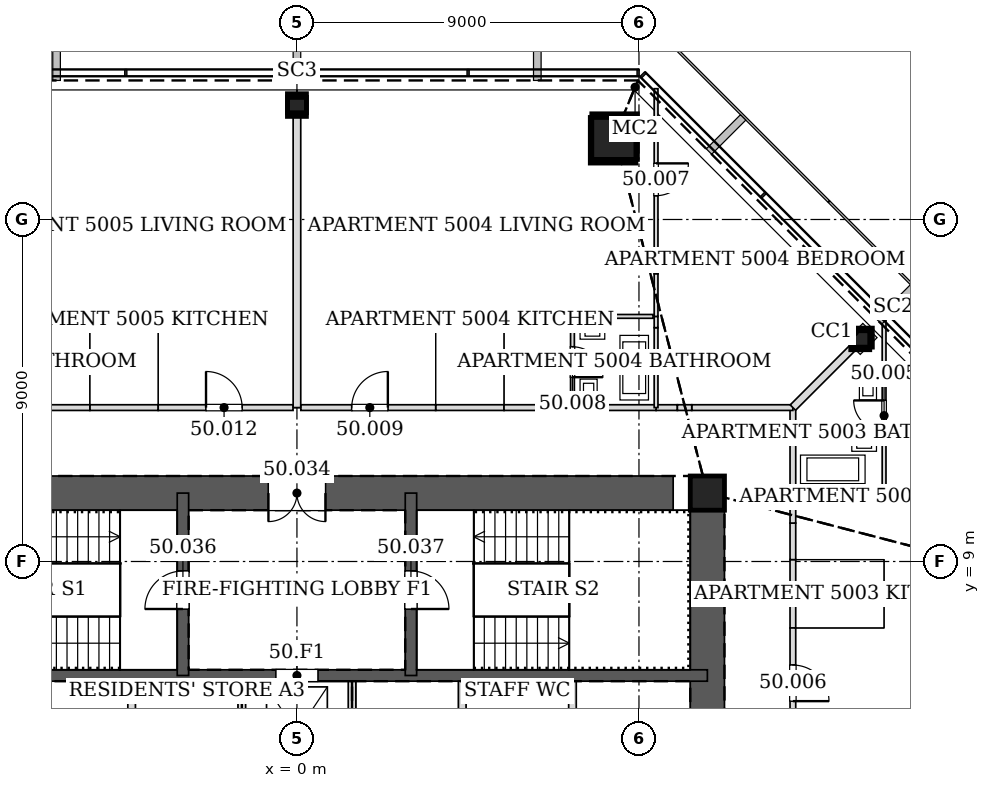
"""IFC4 building model, lengths in metres.
Left out: names, types, materials, properties, quantities, classifications, styles, units other than length and angle.
Written with IfcOpenShell. Run it as: python <this file> out.ifc"""

import sys

from ifc_helpers import new_model, si_unit, direction, frame, frame_2d, origin, origin_2d, place, context, subcontext, project, spatial, rectangle, hollow_rectangle, extrude, element, fill, save


model = new_model("IFC4")
c1 = context("Model", 3, precision=1e-05, world=origin(), true_north=direction((0.0, 1.0)))
c2 = subcontext(c1, "Body", "Model", "MODEL_VIEW")
j1 = project(units=[si_unit("LENGTHUNIT", "METRE"), si_unit("PLANEANGLEUNIT", "RADIAN")], contexts=[c1])
p1 = place(None, origin())
s1 = spatial("IfcSite", under=j1, at=p1, CompositionType="ELEMENT")
p2 = place(p1, origin())
s2 = spatial("IfcBuilding", under=s1, at=p2, CompositionType="ELEMENT")
p3 = place(p2, frame((0.0, 0.0, 217.6)))
s3 = spatial("IfcBuildingStorey", under=s2, at=p3, CompositionType="ELEMENT", Elevation=217.6)
p4 = place(p3, frame((8.359, 20.181, 0.0), z_axis=(-0.01169924247, -0.02827915051, 0.999531598986), x_axis=(0.924045401938, -0.382282742426, 0.0)))
e1 = element("IfcColumn", 1, at=p4, inside=s3, PredefinedType="COLUMN", context=c2, shape_type="SweptSolid", body=[
    extrude(hollow_rectangle(XDim=1.2, YDim=1.2, WallThickness=0.055, at=origin_2d()), origin(), (0.0, 0.0, 1.0), 3.402),
])
for number, where, z_axis, x_axis in (
    (2, (14.891, 14.891, 0.0), (-0.02, -0.02, 1.0), (0.707, -0.707, 0.0)),
    (3, (0.0, 21.059, 0.0), (0.0, -0.028, 1.0), (1.0, 0.0, 0.0)),
):
    element("IfcColumn", number, at=place(p3, frame(where, z_axis=z_axis, x_axis=x_axis)), inside=s3, PredefinedType="COLUMN", context=c2, shape_type="SweptSolid", body=[
        extrude(hollow_rectangle(XDim=0.5, YDim=0.5, WallThickness=0.025, at=origin_2d()), origin(), (0.0, 0.0, 1.0), 3.401),
    ])
p5 = place(p3, frame((10.8, 10.8, 0.0), z_axis=(0.0, 0.0, 1.0), x_axis=(1.0, 0.0, 0.0)))
e4 = element("IfcColumn", 4, at=p5, inside=s3, PredefinedType="COLUMN", context=c2, shape_type="SweptSolid", body=[
    extrude(hollow_rectangle(XDim=0.9, YDim=0.9, WallThickness=0.05, at=origin_2d()), origin(), (0.0, 0.0, 1.0), 3.4),
])
p6 = place(p3, frame((10.8, -10.8, 0.0), z_axis=(0.0, 0.0, 1.0), x_axis=(0.0, 1.0, 0.0)))
e5 = element("IfcWall", 5, at=p6, inside=s3, PredefinedType="SOLIDWALL", context=c2, shape_type="SweptSolid", body=[
    extrude(rectangle(XDim=21.6, YDim=0.9, at=frame_2d((10.8, 0.0))), origin(), (0.0, 0.0, 1.0), 3.4),
])
p7 = place(p6, frame((11.7, 0.0, 0.0)))
e6 = element("IfcOpeningElement", 6, at=p7, cuts=e5, PredefinedType="OPENING", context=c2, shape_type="SweptSolid", body=[
    extrude(rectangle(XDim=1.2, YDim=2.1, at=frame_2d((0.6, 1.05))), frame((0.0, 0.46, 0.0), z_axis=(0.0, -1.0, 0.0), x_axis=(1.0, 0.0, 0.0)), (0.0, 0.0, 1.0), 0.92),
])
p8 = place(p6, frame((8.7, 0.0, 0.0)))
e7 = element("IfcOpeningElement", 7, at=p8, cuts=e5, PredefinedType="OPENING", context=c2, shape_type="SweptSolid", body=[
    extrude(rectangle(XDim=1.2, YDim=2.1, at=frame_2d((0.6, 1.05))), frame((0.0, 0.46, 0.0), z_axis=(0.0, -1.0, 0.0), x_axis=(1.0, 0.0, 0.0)), (0.0, 0.0, 1.0), 0.92),
])
p9 = place(p3, frame((10.8, 10.8, 0.0), z_axis=(0.0, 0.0, 1.0), x_axis=(-1.0, 0.0, 0.0)))
e8 = element("IfcWall", 8, at=p9, inside=s3, PredefinedType="SOLIDWALL", context=c2, shape_type="SweptSolid", body=[
    extrude(rectangle(XDim=21.6, YDim=0.9, at=frame_2d((10.8, 0.0))), origin(), (0.0, 0.0, 1.0), 3.4),
])
p10 = place(p9, frame((10.05, 0.0, 0.0)))
e9 = element("IfcOpeningElement", 9, at=p10, cuts=e8, PredefinedType="OPENING", context=c2, shape_type="SweptSolid", body=[
    extrude(rectangle(XDim=1.5, YDim=2.1, at=frame_2d((0.75, 1.05))), frame((0.0, 0.46, 0.0), z_axis=(0.0, -1.0, 0.0), x_axis=(1.0, 0.0, 0.0)), (0.0, 0.0, 1.0), 0.92),
])
p11 = place(p3, frame((-10.8, 6.0, 0.0), z_axis=(0.0, 0.0, 1.0), x_axis=(1.0, 0.0, 0.0)))
e10 = element("IfcWall", 10, at=p11, inside=s3, PredefinedType="SOLIDWALL", context=c2, shape_type="SweptSolid", body=[
    extrude(rectangle(XDim=21.6, YDim=0.3, at=frame_2d((10.8, 0.0))), origin(), (0.0, 0.0, 1.0), 3.4),
])
p12 = place(p11, frame((10.25, 0.0, 0.0)))
e11 = element("IfcOpeningElement", 11, at=p12, cuts=e10, PredefinedType="OPENING", context=c2, shape_type="SweptSolid", body=[
    extrude(rectangle(XDim=1.1, YDim=2.1, at=frame_2d((0.55, 1.05))), frame((0.0, 0.16, 0.0), z_axis=(0.0, -1.0, 0.0), x_axis=(1.0, 0.0, 0.0)), (0.0, 0.0, 1.0), 0.32),
])
p13 = place(p3, frame((-3.0, 6.0, 0.0), z_axis=(0.0, 0.0, 1.0), x_axis=(0.0, 1.0, 0.0)))
e12 = element("IfcWall", 12, at=p13, inside=s3, PredefinedType="SOLIDWALL", context=c2, shape_type="SweptSolid", body=[
    extrude(rectangle(XDim=4.8, YDim=0.3, at=frame_2d((2.4, 0.0))), origin(), (0.0, 0.0, 1.0), 3.4),
])
p14 = place(p13, frame((1.75, 0.0, 0.0)))
e13 = element("IfcOpeningElement", 13, at=p14, cuts=e12, PredefinedType="OPENING", context=c2, shape_type="SweptSolid", body=[
    extrude(rectangle(XDim=1.0, YDim=2.1, at=frame_2d((0.5, 1.05))), frame((0.0, 0.16, 0.0), z_axis=(0.0, -1.0, 0.0), x_axis=(1.0, 0.0, 0.0)), (0.0, 0.0, 1.0), 0.32),
])
p15 = place(p3, frame((3.0, 6.0, 0.0), z_axis=(0.0, 0.0, 1.0), x_axis=(0.0, 1.0, 0.0)))
e14 = element("IfcWall", 14, at=p15, inside=s3, PredefinedType="SOLIDWALL", context=c2, shape_type="SweptSolid", body=[
    extrude(rectangle(XDim=4.8, YDim=0.3, at=frame_2d((2.4, 0.0))), origin(), (0.0, 0.0, 1.0), 3.4),
])
p16 = place(p15, frame((1.75, 0.0, 0.0)))
e15 = element("IfcOpeningElement", 15, at=p16, cuts=e14, PredefinedType="OPENING", context=c2, shape_type="SweptSolid", body=[
    extrude(rectangle(XDim=1.0, YDim=2.1, at=frame_2d((0.5, 1.05))), frame((0.0, 0.16, 0.0), z_axis=(0.0, -1.0, 0.0), x_axis=(1.0, 0.0, 0.0)), (0.0, 0.0, 1.0), 0.32),
])
p17 = place(p3, frame((13.05, 10.849, 0.0), z_axis=(0.0, 0.0, 1.0), x_axis=(0.0, 1.0, 0.0)))
e16 = element("IfcWall", 16, at=p17, inside=s3, PredefinedType="PARTITIONING", context=c2, shape_type="SweptSolid", body=[
    extrude(rectangle(XDim=2.201, YDim=0.15, at=frame_2d((1.101, 0.0))), origin(), (0.0, 0.0, 1.0), 2.578),
])
p18 = place(p3, frame((13.05, 7.249, 0.0), z_axis=(0.0, 0.0, 1.0), x_axis=(0.0, 1.0, 0.0)))
e17 = element("IfcWall", 17, at=p18, inside=s3, PredefinedType="PARTITIONING", context=c2, shape_type="SweptSolid", body=[
    extrude(rectangle(XDim=1.802, YDim=0.15, at=frame_2d((0.901, 0.0))), origin(), (0.0, 0.0, 1.0), 3.2),
])
p19 = place(p3, frame((13.05, 4.349, 0.0), z_axis=(0.0, 0.0, 1.0), x_axis=(0.0, 1.0, 0.0)))
e18 = element("IfcWall", 18, at=p19, inside=s3, PredefinedType="PARTITIONING", context=c2, shape_type="SweptSolid", body=[
    extrude(rectangle(XDim=2.902, YDim=0.15, at=frame_2d((1.451, 0.0))), origin(), (0.0, 0.0, 1.0), 3.2),
])
p20 = place(p19, frame((0.976, 0.0, 0.0)))
e19 = element("IfcOpeningElement", 19, at=p20, cuts=e18, PredefinedType="OPENING", context=c2, shape_type="SweptSolid", body=[
    extrude(rectangle(XDim=0.95, YDim=2.1, at=frame_2d((0.475, 1.05))), frame((0.0, 0.085, 0.0), z_axis=(0.0, -1.0, 0.0), x_axis=(1.0, 0.0, 0.0)), (0.0, 0.0, 1.0), 0.17),
])
p21 = place(p3, frame((13.05, 9.049, 0.0), z_axis=(0.0, 0.0, 1.0), x_axis=(0.0, 1.0, 0.0)))
e20 = element("IfcWall", 20, at=p21, inside=s3, PredefinedType="PARTITIONING", context=c2, shape_type="SweptSolid", body=[
    extrude(rectangle(XDim=0.962, YDim=0.15, at=frame_2d((0.481, 0.0))), origin(), (0.0, 0.0, 1.0), 3.2),
])
p22 = place(p3, frame((13.05, 10.389, 0.0), z_axis=(0.0, 0.0, 1.0), x_axis=(0.0, 1.0, 0.0)))
e21 = element("IfcWall", 21, at=p22, inside=s3, PredefinedType="PARTITIONING", context=c2, shape_type="SweptSolid", body=[
    extrude(rectangle(XDim=0.462, YDim=0.15, at=frame_2d((0.231, 0.0))), origin(), (0.0, 0.0, 1.0), 3.2),
])
p23 = place(p3, frame((13.05, 10.011, 0.0), z_axis=(0.0, 0.0, 1.0), x_axis=(0.0, 1.0, 0.0)))
e22 = element("IfcWall", 22, at=p23, inside=s3, PredefinedType="PARTITIONING", context=c2, shape_type="SweptSolid", body=[
    extrude(rectangle(XDim=0.378, YDim=0.15, at=frame_2d((0.189, 0.0))), origin(), (0.0, 0.0, 1.0), 2.268),
])
p24 = place(p3, frame((13.05, 13.05, 0.0), z_axis=(0.0, 0.0, 1.0), x_axis=(-1.0, 0.0, 0.0)))
e23 = element("IfcWall", 23, at=p24, inside=s3, PredefinedType="PARTITIONING", context=c2, shape_type="SweptSolid", body=[
    extrude(rectangle(XDim=2.661, YDim=0.15, at=frame_2d((1.331, 0.0))), origin(), (0.0, 0.0, 1.0), 2.578),
])
p25 = place(p3, frame((10.011, 13.05, 0.0), z_axis=(0.0, 0.0, 1.0), x_axis=(-1.0, 0.0, 0.0)))
e24 = element("IfcWall", 24, at=p25, inside=s3, PredefinedType="PARTITIONING", context=c2, shape_type="SweptSolid", body=[
    extrude(rectangle(XDim=0.562, YDim=0.15, at=frame_2d((0.281, 0.0))), origin(), (0.0, 0.0, 1.0), 3.2),
])
p26 = place(p3, frame((10.389, 13.05, 0.0), z_axis=(0.0, 0.0, 1.0), x_axis=(-1.0, 0.0, 0.0)))
e25 = element("IfcWall", 25, at=p26, inside=s3, PredefinedType="PARTITIONING", context=c2, shape_type="SweptSolid", body=[
    extrude(rectangle(XDim=0.378, YDim=0.15, at=frame_2d((0.189, 0.0))), origin(), (0.0, 0.0, 1.0), 2.268),
])
p27 = place(p3, frame((9.451, 13.05, 0.0), z_axis=(0.0, 0.0, 1.0), x_axis=(-1.0, 0.0, 0.0)))
e26 = element("IfcWall", 26, at=p27, inside=s3, PredefinedType="PARTITIONING", context=c2, shape_type="SweptSolid", body=[
    extrude(rectangle(XDim=2.202, YDim=0.15, at=frame_2d((1.101, 0.0))), origin(), (0.0, 0.0, 1.0), 3.2),
])
p28 = place(p3, frame((5.451, 13.05, 0.0), z_axis=(0.0, 0.0, 1.0), x_axis=(-1.0, 0.0, 0.0)))
e27 = element("IfcWall", 27, at=p28, inside=s3, PredefinedType="PARTITIONING", context=c2, shape_type="SweptSolid", body=[
    extrude(rectangle(XDim=1.802, YDim=0.15, at=frame_2d((0.901, 0.0))), origin(), (0.0, 0.0, 1.0), 3.2),
])
p29 = place(p3, frame((3.651, 13.05, 0.0), z_axis=(0.0, 0.0, 1.0), x_axis=(-1.0, 0.0, 0.0)))
e28 = element("IfcWall", 28, at=p29, inside=s3, PredefinedType="PARTITIONING", context=c2, shape_type="SweptSolid", body=[
    extrude(rectangle(XDim=3.549, YDim=0.15, at=frame_2d((1.774, 0.0))), origin(), (0.0, 0.0, 1.0), 3.2),
])
p30 = place(p29, frame((1.259, 0.0, 0.0)))
e29 = element("IfcOpeningElement", 29, at=p30, cuts=e28, PredefinedType="OPENING", context=c2, shape_type="SweptSolid", body=[
    extrude(rectangle(XDim=0.95, YDim=2.1, at=frame_2d((0.475, 1.05))), frame((0.0, 0.085, 0.0), z_axis=(0.0, -1.0, 0.0), x_axis=(1.0, 0.0, 0.0)), (0.0, 0.0, 1.0), 0.17),
])
for number, where, z_axis, x_axis in (
    (30, (7.251, 13.05, 0.0), (0.0, 0.0, 1.0), (-1.0, 0.0, 0.0)),
    (31, (-3.649, 13.05, 0.0), (0.0, 0.0, 1.0), (-1.0, 0.0, 0.0)),
    (32, (-5.449, 13.05, 0.0), (0.0, 0.0, 1.0), (-1.0, 0.0, 0.0)),
):
    element("IfcWall", number, at=place(p3, frame(where, z_axis=z_axis, x_axis=x_axis)), inside=s3, PredefinedType="PARTITIONING", context=c2, shape_type="SweptSolid", body=[
        extrude(rectangle(XDim=1.802, YDim=0.15, at=frame_2d((0.901, 0.0))), origin(), (0.0, 0.0, 1.0), 3.2),
    ])
p31 = place(p3, frame((-0.102, 13.05, 0.0), z_axis=(0.0, 0.0, 1.0), x_axis=(-1.0, 0.0, 0.0)))
e33 = element("IfcWall", 33, at=p31, inside=s3, PredefinedType="PARTITIONING", context=c2, shape_type="SweptSolid", body=[
    extrude(rectangle(XDim=3.549, YDim=0.15, at=frame_2d((1.774, 0.0))), origin(), (0.0, 0.0, 1.0), 3.2),
])
p32 = place(p31, frame((1.34, 0.0, 0.0)))
e34 = element("IfcOpeningElement", 34, at=p32, cuts=e33, PredefinedType="OPENING", context=c2, shape_type="SweptSolid", body=[
    extrude(rectangle(XDim=0.95, YDim=2.1, at=frame_2d((0.475, 1.05))), frame((0.0, 0.085, 0.0), z_axis=(0.0, -1.0, 0.0), x_axis=(1.0, 0.0, 0.0)), (0.0, 0.0, 1.0), 0.17),
])
p33 = place(p3, frame((13.05, 10.85, 0.0), z_axis=(0.0, 0.0, 1.0), x_axis=(1.0, 0.0, 0.0)))
e35 = element("IfcWall", 35, at=p33, inside=s3, PredefinedType="PARTITIONING", context=c2, shape_type="SweptSolid", body=[
    extrude(rectangle(XDim=2.4, YDim=0.1, at=frame_2d((1.2, 0.0))), origin(), (0.0, 0.0, 1.0), 2.786),
])
p34 = place(p3, frame((15.45, 10.85, 0.0), z_axis=(0.0, 0.0, 1.0), x_axis=(0.0, 1.0, 0.0)))
e36 = element("IfcWall", 36, at=p34, inside=s3, PredefinedType="PARTITIONING", context=c2, shape_type="SweptSolid", body=[
    extrude(rectangle(XDim=4.555, YDim=0.1, at=frame_2d((2.278, 0.0))), origin(), (0.0, 0.0, 1.0), 2.783),
])
p35 = place(p34, frame((1.588, 0.0, 0.0)))
e37 = element("IfcOpeningElement", 37, at=p35, cuts=e36, PredefinedType="OPENING", context=c2, shape_type="SweptSolid", body=[
    extrude(rectangle(XDim=0.8, YDim=2.1, at=frame_2d((0.4, 1.05))), frame((0.0, 0.06, 0.0), z_axis=(0.0, -1.0, 0.0), x_axis=(1.0, 0.0, 0.0)), (0.0, 0.0, 1.0), 0.12),
])
p36 = place(p3, frame((14.633, 14.633, 0.0), z_axis=(0.0, 0.0, 1.0), x_axis=(-0.707106781187, -0.707106781187, 0.0)))
e38 = element("IfcWall", 38, at=p36, inside=s3, PredefinedType="PARTITIONING", context=c2, shape_type="SweptSolid", body=[
    extrude(rectangle(XDim=2.238, YDim=0.2, at=frame_2d((1.119, 0.0))), origin(), (0.0, 0.0, 1.0), 2.578),
])
p37 = place(p3, frame((9.45, 15.153, 0.0), z_axis=(0.0, 0.0, 1.0), x_axis=(0.0, -1.0, 0.0)))
e39 = element("IfcWall", 39, at=p37, inside=s3, PredefinedType="PARTITIONING", context=c2, shape_type="SweptSolid", body=[
    extrude(rectangle(XDim=2.103, YDim=0.1, at=frame_2d((1.052, 0.0))), origin(), (0.0, 0.0, 1.0), 2.591),
])
p38 = place(p3, frame((9.45, 15.451, 0.0), z_axis=(0.0, 0.0, 1.0), x_axis=(0.0, -1.0, 0.0)))
e40 = element("IfcWall", 40, at=p38, inside=s3, PredefinedType="PARTITIONING", context=c2, shape_type="SweptSolid", body=[
    extrude(rectangle(XDim=0.298, YDim=0.1, at=frame_2d((0.149, 0.0))), origin(), (0.0, 0.0, 1.0), 2.268),
])
p39 = place(p3, frame((9.45, 21.442, 0.0), z_axis=(0.0, 0.0, 1.0), x_axis=(0.0, -1.0, 0.0)))
e41 = element("IfcWall", 41, at=p39, inside=s3, PredefinedType="PARTITIONING", context=c2, shape_type="SweptSolid", body=[
    extrude(rectangle(XDim=4.873, YDim=0.1, at=frame_2d((2.437, 0.0))), origin(), (0.0, 0.0, 1.0), 2.783),
])
p40 = place(p39, frame((1.965, 0.0, 0.0)))
e42 = element("IfcOpeningElement", 42, at=p40, cuts=e41, PredefinedType="OPENING", context=c2, shape_type="SweptSolid", body=[
    extrude(rectangle(XDim=0.85, YDim=2.1, at=frame_2d((0.425, 1.05))), frame((0.0, 0.06, 0.0), z_axis=(0.0, -1.0, 0.0), x_axis=(1.0, 0.0, 0.0)), (0.0, 0.0, 1.0), 0.12),
])
p41 = place(p3, frame((9.45, 16.568, 0.0), z_axis=(0.0, 0.0, 1.0), x_axis=(0.0, -1.0, 0.0)))
e43 = element("IfcWall", 43, at=p41, inside=s3, PredefinedType="PARTITIONING", context=c2, shape_type="SweptSolid", body=[
    extrude(rectangle(XDim=1.119, YDim=0.1, at=frame_2d((0.56, 0.0))), origin(), (0.0, 0.0, 1.0), 2.268),
])
p42 = place(p3, frame((9.371, 15.45, 0.0), z_axis=(0.0, 0.0, 1.0), x_axis=(-1.0, 0.0, 0.0)))
e44 = element("IfcWall", 44, at=p42, inside=s3, PredefinedType="PARTITIONING", context=c2, shape_type="SweptSolid", body=[
    extrude(rectangle(XDim=2.121, YDim=0.1, at=frame_2d((1.061, 0.0))), origin(), (0.0, 0.0, 1.0), 3.2),
])
p43 = place(p3, frame((7.25, 15.45, 0.0), z_axis=(0.0, 0.0, 1.0), x_axis=(0.0, -1.0, 0.0)))
e45 = element("IfcWall", 45, at=p43, inside=s3, PredefinedType="PARTITIONING", context=c2, shape_type="SweptSolid", body=[
    extrude(rectangle(XDim=2.4, YDim=0.1, at=frame_2d((1.2, 0.0))), origin(), (0.0, 0.0, 1.0), 2.591),
])
p44 = place(p43, frame((0.8, 0.0, 0.0)))
e46 = element("IfcOpeningElement", 46, at=p44, cuts=e45, PredefinedType="OPENING", context=c2, shape_type="SweptSolid", body=[
    extrude(rectangle(XDim=0.8, YDim=2.1, at=frame_2d((0.4, 1.05))), frame((0.0, 0.06, 0.0), z_axis=(0.0, -1.0, 0.0), x_axis=(1.0, 0.0, 0.0)), (0.0, 0.0, 1.0), 0.12),
])
p45 = place(p3, frame((0.0, 20.694, 0.0), z_axis=(0.0, 0.0, 1.0), x_axis=(0.0, -1.0, 0.0)))
e47 = element("IfcWall", 47, at=p45, inside=s3, PredefinedType="PARTITIONING", context=c2, shape_type="SweptSolid", body=[
    extrude(rectangle(XDim=7.644, YDim=0.2, at=frame_2d((3.822, 0.0))), origin(), (0.0, 0.0, 1.0), 2.253),
])
for number, where, z_axis, x_axis in (
    (48, (-4.35, 3.15, 0.0), (0.0, 0.0, 1.0), (0.0, 1.0, 0.0)),
    (49, (-1.45, 3.15, 0.0), (0.0, 0.0, 1.0), (0.0, 1.0, 0.0)),
    (50, (1.45, 3.15, 0.0), (0.0, 0.0, 1.0), (0.0, 1.0, 0.0)),
    (51, (4.35, 3.15, 0.0), (0.0, 0.0, 1.0), (0.0, 1.0, 0.0)),
    (52, (7.25, 3.15, 0.0), (0.0, 0.0, 1.0), (0.0, 1.0, 0.0)),
):
    element("IfcWall", number, at=place(p3, frame(where, z_axis=z_axis, x_axis=x_axis)), inside=s3, PredefinedType="PARTITIONING", context=c2, shape_type="SweptSolid", body=[
        extrude(rectangle(XDim=2.7, YDim=0.2, at=frame_2d((1.35, 0.0))), origin(), (0.0, 0.0, 1.0), 3.2),
    ])
p46 = place(p35, origin())
e53 = element("IfcDoor", 53, at=p46, inside=s3, OperationType="SINGLE_SWING_RIGHT", PredefinedType="DOOR", context=c2, shape_type="SweptSolid", body=[
    extrude(rectangle(XDim=0.8, YDim=2.1, at=frame_2d((0.4, 1.05))), frame((0.0, 0.025, 0.0), z_axis=(0.0, -1.0, 0.0), x_axis=(1.0, 0.0, 0.0)), (0.0, 0.0, 1.0), 0.05),
])
fill(e37, e53)
p47 = place(p20, frame((0.95, 0.0, 0.0), z_axis=(0.0, 0.0, 1.0), x_axis=(-1.0, 0.0, 0.0)))
e54 = element("IfcDoor", 54, at=p47, inside=s3, OperationType="SINGLE_SWING_RIGHT", PredefinedType="DOOR", context=c2, shape_type="SweptSolid", body=[
    extrude(rectangle(XDim=0.95, YDim=2.1, at=frame_2d((0.475, 1.05))), frame((0.0, 0.025, 0.0), z_axis=(0.0, -1.0, 0.0), x_axis=(1.0, 0.0, 0.0)), (0.0, 0.0, 1.0), 0.05),
])
fill(e19, e54)
p48 = place(p40, origin())
e55 = element("IfcDoor", 55, at=p48, inside=s3, OperationType="SINGLE_SWING_LEFT", PredefinedType="DOOR", context=c2, shape_type="SweptSolid", body=[
    extrude(rectangle(XDim=0.85, YDim=2.1, at=frame_2d((0.425, 1.05))), frame((0.0, 0.025, 0.0), z_axis=(0.0, -1.0, 0.0), x_axis=(1.0, 0.0, 0.0)), (0.0, 0.0, 1.0), 0.05),
])
fill(e42, e55)
p49 = place(p44, origin())
e56 = element("IfcDoor", 56, at=p49, inside=s3, OperationType="SINGLE_SWING_RIGHT", PredefinedType="DOOR", context=c2, shape_type="SweptSolid", body=[
    extrude(rectangle(XDim=0.8, YDim=2.1, at=frame_2d((0.4, 1.05))), frame((0.0, 0.025, 0.0), z_axis=(0.0, -1.0, 0.0), x_axis=(1.0, 0.0, 0.0)), (0.0, 0.0, 1.0), 0.05),
])
fill(e46, e56)
p50 = place(p30, frame((0.95, 0.0, 0.0), z_axis=(0.0, 0.0, 1.0), x_axis=(-1.0, 0.0, 0.0)))
e57 = element("IfcDoor", 57, at=p50, inside=s3, OperationType="SINGLE_SWING_RIGHT", PredefinedType="DOOR", context=c2, shape_type="SweptSolid", body=[
    extrude(rectangle(XDim=0.95, YDim=2.1, at=frame_2d((0.475, 1.05))), frame((0.0, 0.025, 0.0), z_axis=(0.0, -1.0, 0.0), x_axis=(1.0, 0.0, 0.0)), (0.0, 0.0, 1.0), 0.05),
])
fill(e29, e57)
p51 = place(p32, frame((0.95, 0.0, 0.0), z_axis=(0.0, 0.0, 1.0), x_axis=(-1.0, 0.0, 0.0)))
e58 = element("IfcDoor", 58, at=p51, inside=s3, OperationType="SINGLE_SWING_LEFT", PredefinedType="DOOR", context=c2, shape_type="SweptSolid", body=[
    extrude(rectangle(XDim=0.95, YDim=2.1, at=frame_2d((0.475, 1.05))), frame((0.0, 0.025, 0.0), z_axis=(0.0, -1.0, 0.0), x_axis=(1.0, 0.0, 0.0)), (0.0, 0.0, 1.0), 0.05),
])
fill(e34, e58)
p52 = place(p10, origin())
e59 = element("IfcDoor", 59, at=p52, inside=s3, OperationType="DOUBLE_DOOR_SINGLE_SWING", PredefinedType="DOOR", context=c2, shape_type="SweptSolid", body=[
    extrude(rectangle(XDim=1.5, YDim=2.1, at=frame_2d((0.75, 1.05))), frame((0.0, 0.025, 0.0), z_axis=(0.0, -1.0, 0.0), x_axis=(1.0, 0.0, 0.0)), (0.0, 0.0, 1.0), 0.05),
])
fill(e9, e59)
p53 = place(p14, origin())
e60 = element("IfcDoor", 60, at=p53, inside=s3, OperationType="SINGLE_SWING_LEFT", PredefinedType="DOOR", context=c2, shape_type="SweptSolid", body=[
    extrude(rectangle(XDim=1.0, YDim=2.1, at=frame_2d((0.5, 1.05))), frame((0.0, 0.025, 0.0), z_axis=(0.0, -1.0, 0.0), x_axis=(1.0, 0.0, 0.0)), (0.0, 0.0, 1.0), 0.05),
])
fill(e13, e60)
p54 = place(p16, frame((1.0, 0.0, 0.0), z_axis=(0.0, 0.0, 1.0), x_axis=(-1.0, 0.0, 0.0)))
e61 = element("IfcDoor", 61, at=p54, inside=s3, OperationType="SINGLE_SWING_RIGHT", PredefinedType="DOOR", context=c2, shape_type="SweptSolid", body=[
    extrude(rectangle(XDim=1.0, YDim=2.1, at=frame_2d((0.5, 1.05))), frame((0.0, 0.025, 0.0), z_axis=(0.0, -1.0, 0.0), x_axis=(1.0, 0.0, 0.0)), (0.0, 0.0, 1.0), 0.05),
])
fill(e15, e61)
p55 = place(p12, origin())
e62 = element("IfcDoor", 62, at=p55, inside=s3, OperationType="DOUBLE_DOOR_SLIDING", PredefinedType="DOOR", context=c2, shape_type="SweptSolid", body=[
    extrude(rectangle(XDim=1.1, YDim=2.1, at=frame_2d((0.55, 1.05))), frame((0.0, 0.025, 0.0), z_axis=(0.0, -1.0, 0.0), x_axis=(1.0, 0.0, 0.0)), (0.0, 0.0, 1.0), 0.05),
])
fill(e11, e62)
save(model, sys.argv[1])
